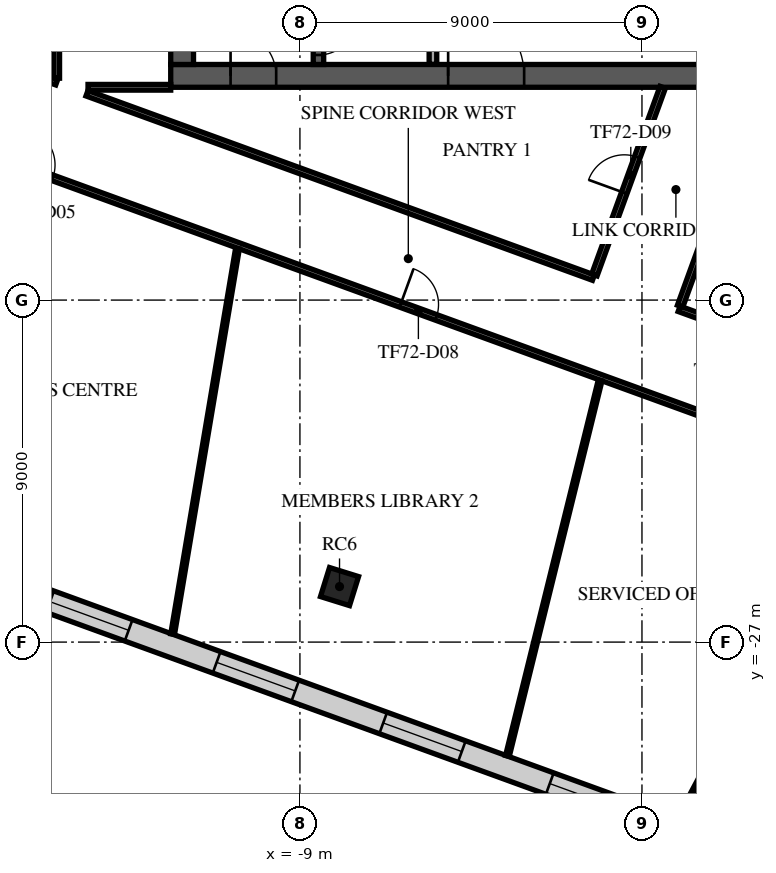
"""IFC4 building model, lengths in metres.
Left out: names, types, materials, properties, quantities, classifications, styles, units other than length and angle.
Written with IfcOpenShell. Run it as: python <this file> out.ifc"""

import sys

from ifc_helpers import new_model, si_unit, direction, frame, frame_2d, origin, origin_2d, place, context, subcontext, project, spatial, rectangle, extrude, element, fill, save


model = new_model("IFC4")
c1 = context("Model", 3, precision=1e-05, world=origin(), true_north=direction((0.0, 1.0)))
c2 = subcontext(c1, "Body", "Model", "MODEL_VIEW")
j1 = project(units=[si_unit("LENGTHUNIT", "METRE"), si_unit("PLANEANGLEUNIT", "RADIAN")], contexts=[c1])
p1 = place(None, origin())
s1 = spatial("IfcSite", under=j1, at=p1, CompositionType="ELEMENT")
p2 = place(p1, origin())
s2 = spatial("IfcBuilding", under=s1, at=p2, CompositionType="ELEMENT")
p3 = place(p2, frame((0.0, 0.0, 304.5)))
s3 = spatial("IfcBuildingStorey", under=s2, at=p3, CompositionType="ELEMENT", Elevation=304.5)
p4 = place(p3, frame((-7.958, -25.539, 0.0), z_axis=(0.0, 0.0, 1.0), x_axis=(0.297503182032, 0.954720826567, 0.0)))
e1 = element("IfcColumn", 1, at=p4, inside=s3, PredefinedType="COLUMN", context=c2, shape_type="SweptSolid", body=[
    extrude(rectangle(XDim=0.8, YDim=0.8, at=origin_2d()), origin(), (0.0, 0.0, 1.0), 4.0),
])
p5 = place(p3, frame((-12.4, -12.1, 0.0), z_axis=(0.0, 0.0, 1.0), x_axis=(1.0, 0.0, 0.0)))
e2 = element("IfcWall", 2, at=p5, inside=s3, PredefinedType="SHEAR", context=c2, shape_type="SweptSolid", body=[
    extrude(rectangle(XDim=24.8, YDim=0.6, at=frame_2d((12.4, 0.0))), origin(), (0.0, 0.0, 1.0), 3.65),
])
p6 = place(p5, frame((7.3, 0.0, 0.0)))
e3 = element("IfcOpeningElement", 3, at=p6, cuts=e2, PredefinedType="OPENING", context=c2, shape_type="SweptSolid", body=[
    extrude(rectangle(XDim=2.0, YDim=2.1, at=frame_2d((1.0, 1.05))), frame((0.0, 0.31, 0.0), z_axis=(0.0, -1.0, 0.0), x_axis=(1.0, 0.0, 0.0)), (0.0, 0.0, 1.0), 0.62),
])
p7 = place(p5, frame((17.425, 0.0, 0.0)))
e4 = element("IfcOpeningElement", 4, at=p7, cuts=e2, PredefinedType="OPENING", context=c2, shape_type="SweptSolid", body=[
    extrude(rectangle(XDim=1.2, YDim=2.1, at=frame_2d((0.6, 1.05))), frame((0.0, 0.31, 0.0), z_axis=(0.0, -1.0, 0.0), x_axis=(1.0, 0.0, 0.0)), (0.0, 0.0, 1.0), 0.62),
])
p8 = place(p5, frame((1.575, 0.0, 0.0)))
e5 = element("IfcOpeningElement", 5, at=p8, cuts=e2, PredefinedType="OPENING", context=c2, shape_type="SweptSolid", body=[
    extrude(rectangle(XDim=1.2, YDim=2.1, at=frame_2d((0.6, 1.05))), frame((0.0, 0.31, 0.0), z_axis=(0.0, -1.0, 0.0), x_axis=(1.0, 0.0, 0.0)), (0.0, 0.0, 1.0), 0.62),
])
p9 = place(p5, frame((22.025, 0.0, 0.0)))
e6 = element("IfcOpeningElement", 6, at=p9, cuts=e2, PredefinedType="OPENING", context=c2, shape_type="SweptSolid", body=[
    extrude(rectangle(XDim=1.2, YDim=2.1, at=frame_2d((0.6, 1.05))), frame((0.0, 0.31, 0.0), z_axis=(0.0, -1.0, 0.0), x_axis=(1.0, 0.0, 0.0)), (0.0, 0.0, 1.0), 0.62),
])
p10 = place(p3, frame((-12.1, -11.8, 0.0), z_axis=(0.0, 0.0, 1.0), x_axis=(0.0, 1.0, 0.0)))
e7 = element("IfcWall", 7, at=p10, inside=s3, PredefinedType="SHEAR", context=c2, shape_type="SweptSolid", body=[
    extrude(rectangle(XDim=23.6, YDim=0.6, at=frame_2d((11.8, 0.0))), origin(), (0.0, 0.0, 1.0), 3.65),
])
p11 = place(p10, frame((10.6, 0.0, 0.0)))
e8 = element("IfcOpeningElement", 8, at=p11, cuts=e7, PredefinedType="OPENING", context=c2, shape_type="SweptSolid", body=[
    extrude(rectangle(XDim=2.4, YDim=2.4, at=frame_2d((1.2, 1.2))), frame((0.0, 0.31, 0.0), z_axis=(0.0, -1.0, 0.0), x_axis=(1.0, 0.0, 0.0)), (0.0, 0.0, 1.0), 0.62),
])
p12 = place(p3, frame((-8.512, -4.55, 0.0), z_axis=(0.0, 0.0, 1.0), x_axis=(0.0, -1.0, 0.0)))
e9 = element("IfcWall", 9, at=p12, inside=s3, PredefinedType="SOLIDWALL", context=c2, shape_type="SweptSolid", body=[
    extrude(rectangle(XDim=7.25, YDim=0.275, at=frame_2d((3.625, 0.0))), origin(), (0.0, 0.0, 1.0), 3.65),
])
p13 = place(p12, frame((6.0, 0.0, 0.0)))
e10 = element("IfcOpeningElement", 10, at=p13, cuts=e9, PredefinedType="OPENING", context=c2, shape_type="SweptSolid", body=[
    extrude(rectangle(XDim=1.0, YDim=2.1, at=frame_2d((0.5, 1.05))), frame((0.0, 0.147, 0.0), z_axis=(0.0, -1.0, 0.0), x_axis=(1.0, 0.0, 0.0)), (0.0, 0.0, 1.0), 0.295),
])
p14 = place(p3, frame((-5.5, -11.795, 0.0), z_axis=(0.0, 0.0, 1.0), x_axis=(0.0, 1.0, 0.0)))
e11 = element("IfcWall", 11, at=p14, inside=s3, PredefinedType="PARTITIONING", context=c2, shape_type="SweptSolid", body=[
    extrude(rectangle(XDim=2.99, YDim=0.2, at=frame_2d((1.495, 0.0))), origin(), (0.0, 0.0, 1.0), 3.65),
])
p15 = place(p14, frame((0.657, 0.0, 0.0)))
e12 = element("IfcOpeningElement", 12, at=p15, cuts=e11, PredefinedType="OPENING", context=c2, shape_type="SweptSolid", body=[
    extrude(rectangle(XDim=1.8, YDim=2.1, at=frame_2d((0.9, 1.05))), frame((0.0, 0.11, 0.0), z_axis=(0.0, -1.0, 0.0), x_axis=(1.0, 0.0, 0.0)), (0.0, 0.0, 1.0), 0.22),
])
p16 = place(p3, frame((-29.882, -20.73, 0.0), z_axis=(0.0, 0.0, 1.0), x_axis=(0.939693709578, -0.34201715188, 0.0)))
e13 = element("IfcWall", 13, at=p16, inside=s3, PredefinedType="STANDARD", context=c2, shape_type="SweptSolid", body=[
    extrude(rectangle(XDim=41.979, YDim=0.6, at=frame_2d((20.99, 0.0))), origin(), (0.0, 0.0, 1.0), 3.65),
])
p17 = place(p16, frame((1.232, 0.0, 0.9)))
e14 = element("IfcOpeningElement", 14, at=p17, cuts=e13, PredefinedType="OPENING", context=c2, shape_type="SweptSolid", body=[
    extrude(rectangle(XDim=2.2, YDim=2.1, at=frame_2d((1.1, 1.05))), frame((0.0, 0.31, 0.0), z_axis=(0.0, -1.0, 0.0), x_axis=(1.0, 0.0, 0.0)), (0.0, 0.0, 1.0), 0.62),
])
p18 = place(p16, frame((5.896, 0.0, 0.9)))
e15 = element("IfcOpeningElement", 15, at=p18, cuts=e13, PredefinedType="OPENING", context=c2, shape_type="SweptSolid", body=[
    extrude(rectangle(XDim=2.2, YDim=2.1, at=frame_2d((1.1, 1.05))), frame((0.0, 0.31, 0.0), z_axis=(0.0, -1.0, 0.0), x_axis=(1.0, 0.0, 0.0)), (0.0, 0.0, 1.0), 0.62),
])
p19 = place(p16, frame((10.561, 0.0, 0.9)))
e16 = element("IfcOpeningElement", 16, at=p19, cuts=e13, PredefinedType="OPENING", context=c2, shape_type="SweptSolid", body=[
    extrude(rectangle(XDim=2.2, YDim=2.1, at=frame_2d((1.1, 1.05))), frame((0.0, 0.31, 0.0), z_axis=(0.0, -1.0, 0.0), x_axis=(1.0, 0.0, 0.0)), (0.0, 0.0, 1.0), 0.62),
])
p20 = place(p16, frame((15.225, 0.0, 0.9)))
e17 = element("IfcOpeningElement", 17, at=p20, cuts=e13, PredefinedType="OPENING", context=c2, shape_type="SweptSolid", body=[
    extrude(rectangle(XDim=2.2, YDim=2.1, at=frame_2d((1.1, 1.05))), frame((0.0, 0.31, 0.0), z_axis=(0.0, -1.0, 0.0), x_axis=(1.0, 0.0, 0.0)), (0.0, 0.0, 1.0), 0.62),
])
p21 = place(p16, frame((19.89, 0.0, 0.9)))
e18 = element("IfcOpeningElement", 18, at=p21, cuts=e13, PredefinedType="OPENING", context=c2, shape_type="SweptSolid", body=[
    extrude(rectangle(XDim=2.2, YDim=2.1, at=frame_2d((1.1, 1.05))), frame((0.0, 0.31, 0.0), z_axis=(0.0, -1.0, 0.0), x_axis=(1.0, 0.0, 0.0)), (0.0, 0.0, 1.0), 0.62),
])
p22 = place(p16, frame((24.554, 0.0, 0.9)))
e19 = element("IfcOpeningElement", 19, at=p22, cuts=e13, PredefinedType="OPENING", context=c2, shape_type="SweptSolid", body=[
    extrude(rectangle(XDim=2.2, YDim=2.1, at=frame_2d((1.1, 1.05))), frame((0.0, 0.31, 0.0), z_axis=(0.0, -1.0, 0.0), x_axis=(1.0, 0.0, 0.0)), (0.0, 0.0, 1.0), 0.62),
])
p23 = place(p16, frame((29.218, 0.0, 0.9)))
e20 = element("IfcOpeningElement", 20, at=p23, cuts=e13, PredefinedType="OPENING", context=c2, shape_type="SweptSolid", body=[
    extrude(rectangle(XDim=2.2, YDim=2.1, at=frame_2d((1.1, 1.05))), frame((0.0, 0.31, 0.0), z_axis=(0.0, -1.0, 0.0), x_axis=(1.0, 0.0, 0.0)), (0.0, 0.0, 1.0), 0.62),
])
p24 = place(p16, frame((33.883, 0.0, 0.9)))
e21 = element("IfcOpeningElement", 21, at=p24, cuts=e13, PredefinedType="OPENING", context=c2, shape_type="SweptSolid", body=[
    extrude(rectangle(XDim=2.2, YDim=2.1, at=frame_2d((1.1, 1.05))), frame((0.0, 0.31, 0.0), z_axis=(0.0, -1.0, 0.0), x_axis=(1.0, 0.0, 0.0)), (0.0, 0.0, 1.0), 0.62),
])
p25 = place(p16, frame((38.547, 0.0, 0.9)))
e22 = element("IfcOpeningElement", 22, at=p25, cuts=e13, PredefinedType="OPENING", context=c2, shape_type="SweptSolid", body=[
    extrude(rectangle(XDim=2.2, YDim=2.1, at=frame_2d((1.1, 1.05))), frame((0.0, 0.31, 0.0), z_axis=(0.0, -1.0, 0.0), x_axis=(1.0, 0.0, 0.0)), (0.0, 0.0, 1.0), 0.62),
])
p26 = place(p3, frame((-24.679, -11.445, 0.0), z_axis=(0.0, 0.0, 1.0), x_axis=(0.939685239834, -0.342040421645, 0.0)))
e23 = element("IfcWall", 23, at=p26, inside=s3, PredefinedType="PARTITIONING", context=c2, shape_type="SweptSolid", body=[
    extrude(rectangle(XDim=38.628, YDim=0.15, at=frame_2d((19.314, 0.0))), origin(), (0.0, 0.0, 1.0), 3.25),
])
p27 = place(p26, frame((8.764, 0.0, 0.0)))
e24 = element("IfcOpeningElement", 24, at=p27, cuts=e23, PredefinedType="OPENING", context=c2, shape_type="SweptSolid", body=[
    extrude(rectangle(XDim=1.0, YDim=2.1, at=frame_2d((0.5, 1.05))), frame((0.0, 0.085, 0.0), z_axis=(0.0, -1.0, 0.0), x_axis=(1.0, 0.0, 0.0)), (0.0, 0.0, 1.0), 0.17),
])
p28 = place(p26, frame((19.503, 0.0, 0.0)))
e25 = element("IfcOpeningElement", 25, at=p28, cuts=e23, PredefinedType="OPENING", context=c2, shape_type="SweptSolid", body=[
    extrude(rectangle(XDim=1.0, YDim=2.1, at=frame_2d((0.5, 1.05))), frame((0.0, 0.085, 0.0), z_axis=(0.0, -1.0, 0.0), x_axis=(1.0, 0.0, 0.0)), (0.0, 0.0, 1.0), 0.17),
])
p29 = place(p26, frame((29.163, 0.0, 0.0)))
e26 = element("IfcOpeningElement", 26, at=p29, cuts=e23, PredefinedType="OPENING", context=c2, shape_type="SweptSolid", body=[
    extrude(rectangle(XDim=1.0, YDim=2.1, at=frame_2d((0.5, 1.05))), frame((0.0, 0.085, 0.0), z_axis=(0.0, -1.0, 0.0), x_axis=(1.0, 0.0, 0.0)), (0.0, 0.0, 1.0), 0.17),
])
p30 = place(p3, frame((-23.858, -9.19, 0.0), z_axis=(0.0, 0.0, 1.0), x_axis=(0.939702320302, -0.341993492948, 0.0)))
e27 = element("IfcWall", 27, at=p30, inside=s3, PredefinedType="PARTITIONING", context=c2, shape_type="SweptSolid", body=[
    extrude(rectangle(XDim=9.001, YDim=0.15, at=frame_2d((4.5, 0.0))), origin(), (0.0, 0.0, 1.0), 3.25),
])
p31 = place(p30, frame((1.05, 0.0, 0.0)))
e28 = element("IfcOpeningElement", 28, at=p31, cuts=e27, PredefinedType="OPENING", context=c2, shape_type="SweptSolid", body=[
    extrude(rectangle(XDim=1.0, YDim=2.1, at=frame_2d((0.5, 1.05))), frame((0.0, 0.085, 0.0), z_axis=(0.0, -1.0, 0.0), x_axis=(1.0, 0.0, 0.0)), (0.0, 0.0, 1.0), 0.17),
])
p32 = place(p3, frame((-15.4, -12.161, 0.0), z_axis=(0.0, 0.0, 1.0), x_axis=(0.0, 1.0, 0.0)))
e29 = element("IfcWall", 29, at=p32, inside=s3, PredefinedType="PARTITIONING", context=c2, shape_type="SweptSolid", body=[
    extrude(rectangle(XDim=24.561, YDim=0.15, at=frame_2d((12.28, 0.0))), origin(), (0.0, 0.0, 1.0), 3.25),
])
p33 = place(p32, frame((0.8, 0.0, 0.0)))
e30 = element("IfcOpeningElement", 30, at=p33, cuts=e29, PredefinedType="OPENING", context=c2, shape_type="SweptSolid", body=[
    extrude(rectangle(XDim=1.8, YDim=2.1, at=frame_2d((0.9, 1.05))), frame((0.0, 0.085, 0.0), z_axis=(0.0, -1.0, 0.0), x_axis=(1.0, 0.0, 0.0)), (0.0, 0.0, 1.0), 0.17),
])
p34 = place(p32, frame((11.845, 0.0, 0.0)))
e31 = element("IfcOpeningElement", 31, at=p34, cuts=e29, PredefinedType="OPENING", context=c2, shape_type="SweptSolid", body=[
    extrude(rectangle(XDim=1.0, YDim=2.1, at=frame_2d((0.5, 1.05))), frame((0.0, 0.085, 0.0), z_axis=(0.0, -1.0, 0.0), x_axis=(1.0, 0.0, 0.0)), (0.0, 0.0, 1.0), 0.17),
])
p35 = place(p32, frame((16.824, 0.0, 0.0)))
e32 = element("IfcOpeningElement", 32, at=p35, cuts=e29, PredefinedType="OPENING", context=c2, shape_type="SweptSolid", body=[
    extrude(rectangle(XDim=1.0, YDim=2.1, at=frame_2d((0.5, 1.05))), frame((0.0, 0.085, 0.0), z_axis=(0.0, -1.0, 0.0), x_axis=(1.0, 0.0, 0.0)), (0.0, 0.0, 1.0), 0.17),
])
p36 = place(p3, frame((-14.604, -12.558, 0.0), z_axis=(0.0, 0.0, 1.0), x_axis=(0.93968732693, -0.342034687724, 0.0)))
e33 = element("IfcWall", 33, at=p36, inside=s3, PredefinedType="PARTITIONING", context=c2, shape_type="SweptSolid", body=[
    extrude(rectangle(XDim=14.182, YDim=0.15, at=frame_2d((7.091, 0.0))), origin(), (0.0, 0.0, 1.0), 3.25),
])
p37 = place(p3, frame((-14.576, -12.4, 0.0), z_axis=(0.0, 0.0, 1.0), x_axis=(1.0, 0.0, 0.0)))
e34 = element("IfcWall", 34, at=p37, inside=s3, PredefinedType="PARTITIONING", context=c2, shape_type="SweptSolid", body=[
    extrude(rectangle(XDim=2.176, YDim=0.15, at=frame_2d((1.088, 0.0))), origin(), (0.0, 0.0, 1.0), 3.13),
])
p38 = place(p3, frame((-1.251, -17.338, 0.0), z_axis=(0.0, 0.0, 1.0), x_axis=(0.341963126629, 0.939713371207, 0.0)))
e35 = element("IfcWall", 35, at=p38, inside=s3, PredefinedType="PARTITIONING", context=c2, shape_type="SweptSolid", body=[
    extrude(rectangle(XDim=5.255, YDim=0.15, at=frame_2d((2.628, 0.0))), origin(), (0.0, 0.0, 1.0), 3.65),
])
p39 = place(p38, frame((2.3, 0.0, 0.0)))
e36 = element("IfcOpeningElement", 36, at=p39, cuts=e35, PredefinedType="OPENING", context=c2, shape_type="SweptSolid", body=[
    extrude(rectangle(XDim=1.0, YDim=2.1, at=frame_2d((0.5, 1.05))), frame((0.0, 0.085, 0.0), z_axis=(0.0, -1.0, 0.0), x_axis=(1.0, 0.0, 0.0)), (0.0, 0.0, 1.0), 0.17),
])
p40 = place(p3, frame((0.978, -18.23, 0.0), z_axis=(0.0, 0.0, 1.0), x_axis=(0.939684094149, -0.34204356916, 0.0)))
e37 = element("IfcWall", 37, at=p40, inside=s3, PredefinedType="PARTITIONING", context=c2, shape_type="SweptSolid", body=[
    extrude(rectangle(XDim=12.198, YDim=0.15, at=frame_2d((6.099, 0.0))), origin(), (0.0, 0.0, 1.0), 3.25),
])
p41 = place(p40, frame((1.05, 0.0, 0.0)))
e38 = element("IfcOpeningElement", 38, at=p41, cuts=e37, PredefinedType="OPENING", context=c2, shape_type="SweptSolid", body=[
    extrude(rectangle(XDim=1.0, YDim=2.1, at=frame_2d((0.5, 1.05))), frame((0.0, 0.085, 0.0), z_axis=(0.0, -1.0, 0.0), x_axis=(1.0, 0.0, 0.0)), (0.0, 0.0, 1.0), 0.17),
])
p42 = place(p40, frame((9.083, 0.0, 0.0)))
e39 = element("IfcOpeningElement", 39, at=p42, cuts=e37, PredefinedType="OPENING", context=c2, shape_type="SweptSolid", body=[
    extrude(rectangle(XDim=1.0, YDim=2.1, at=frame_2d((0.5, 1.05))), frame((0.0, 0.085, 0.0), z_axis=(0.0, -1.0, 0.0), x_axis=(1.0, 0.0, 0.0)), (0.0, 0.0, 1.0), 0.17),
])
p43 = place(p3, frame((1.004, -18.159, 0.0), z_axis=(0.0, 0.0, 1.0), x_axis=(0.342023405877, 0.939691433308, 0.0)))
e40 = element("IfcWall", 40, at=p43, inside=s3, PredefinedType="PARTITIONING", context=c2, shape_type="SweptSolid", body=[
    extrude(rectangle(XDim=2.937, YDim=0.15, at=frame_2d((1.468, 0.0))), origin(), (0.0, 0.0, 1.0), 3.65),
])
p44 = place(p3, frame((-12.349, -26.79, 0.0), z_axis=(0.0, 0.0, 1.0), x_axis=(0.165814832818, 0.986156904969, 0.0)))
e41 = element("IfcWall", 41, at=p44, inside=s3, PredefinedType="PARTITIONING", context=c2, shape_type="SweptSolid", body=[
    extrude(rectangle(XDim=10.289, YDim=0.1, at=frame_2d((5.145, 0.0))), origin(), (0.0, 0.0, 1.0), 3.05),
])
p45 = place(p3, frame((-3.54, -29.996, 0.0), z_axis=(0.0, 0.0, 1.0), x_axis=(0.239628478721, 0.970864662137, 0.0)))
e42 = element("IfcWall", 42, at=p45, inside=s3, PredefinedType="PARTITIONING", context=c2, shape_type="SweptSolid", body=[
    extrude(rectangle(XDim=10.18, YDim=0.1, at=frame_2d((5.09, 0.0))), origin(), (0.0, 0.0, 1.0), 3.05),
])
p46 = place(p3, frame((0.982, -31.642, 0.0), z_axis=(0.0, 0.0, 1.0), x_axis=(0.469538881217, 0.882911795722, 0.0)))
e43 = element("IfcWall", 43, at=p46, inside=s3, PredefinedType="PARTITIONING", context=c2, shape_type="SweptSolid", body=[
    extrude(rectangle(XDim=10.219, YDim=0.1, at=frame_2d((5.11, 0.0))), origin(), (0.0, 0.0, 1.0), 3.05),
])
p47 = place(p6, origin())
e44 = element("IfcDoor", 44, at=p47, inside=s3, OperationType="SINGLE_SWING_LEFT", PredefinedType="DOOR", context=c2, shape_type="SweptSolid", body=[
    extrude(rectangle(XDim=2.0, YDim=2.1, at=frame_2d((1.0, 1.05))), frame((0.0, 0.025, 0.0), z_axis=(0.0, -1.0, 0.0), x_axis=(1.0, 0.0, 0.0)), (0.0, 0.0, 1.0), 0.05),
])
fill(e3, e44)
p48 = place(p8, origin())
e45 = element("IfcDoor", 45, at=p48, inside=s3, OperationType="SINGLE_SWING_LEFT", PredefinedType="DOOR", context=c2, shape_type="SweptSolid", body=[
    extrude(rectangle(XDim=1.2, YDim=2.1, at=frame_2d((0.6, 1.05))), frame((0.0, 0.025, 0.0), z_axis=(0.0, -1.0, 0.0), x_axis=(1.0, 0.0, 0.0)), (0.0, 0.0, 1.0), 0.05),
])
fill(e5, e45)
p49 = place(p13, origin())
e46 = element("IfcDoor", 46, at=p49, inside=s3, OperationType="SINGLE_SWING_LEFT", PredefinedType="DOOR", context=c2, shape_type="SweptSolid", body=[
    extrude(rectangle(XDim=1.0, YDim=2.1, at=frame_2d((0.5, 1.05))), frame((0.0, 0.025, 0.0), z_axis=(0.0, -1.0, 0.0), x_axis=(1.0, 0.0, 0.0)), (0.0, 0.0, 1.0), 0.05),
])
fill(e10, e46)
p50 = place(p20, origin())
e47 = element("IfcWindow", 47, at=p50, inside=s3, PartitioningType="SINGLE_PANEL", PredefinedType="WINDOW", context=c2, shape_type="SweptSolid", body=[
    extrude(rectangle(XDim=2.2, YDim=2.1, at=frame_2d((1.1, 1.05))), frame((0.0, 0.03, 0.0), z_axis=(0.0, -1.0, 0.0), x_axis=(1.0, 0.0, 0.0)), (0.0, 0.0, 1.0), 0.06),
])
fill(e17, e47)
p51 = place(p21, origin())
e48 = element("IfcWindow", 48, at=p51, inside=s3, PartitioningType="SINGLE_PANEL", PredefinedType="WINDOW", context=c2, shape_type="SweptSolid", body=[
    extrude(rectangle(XDim=2.2, YDim=2.1, at=frame_2d((1.1, 1.05))), frame((0.0, 0.03, 0.0), z_axis=(0.0, -1.0, 0.0), x_axis=(1.0, 0.0, 0.0)), (0.0, 0.0, 1.0), 0.06),
])
fill(e18, e48)
p52 = place(p22, origin())
e49 = element("IfcWindow", 49, at=p52, inside=s3, PartitioningType="SINGLE_PANEL", PredefinedType="WINDOW", context=c2, shape_type="SweptSolid", body=[
    extrude(rectangle(XDim=2.2, YDim=2.1, at=frame_2d((1.1, 1.05))), frame((0.0, 0.03, 0.0), z_axis=(0.0, -1.0, 0.0), x_axis=(1.0, 0.0, 0.0)), (0.0, 0.0, 1.0), 0.06),
])
fill(e19, e49)
p53 = place(p23, origin())
e50 = element("IfcWindow", 50, at=p53, inside=s3, PartitioningType="SINGLE_PANEL", PredefinedType="WINDOW", context=c2, shape_type="SweptSolid", body=[
    extrude(rectangle(XDim=2.2, YDim=2.1, at=frame_2d((1.1, 1.05))), frame((0.0, 0.03, 0.0), z_axis=(0.0, -1.0, 0.0), x_axis=(1.0, 0.0, 0.0)), (0.0, 0.0, 1.0), 0.06),
])
fill(e20, e50)
p54 = place(p27, frame((1.0, 0.0, 0.0), z_axis=(0.0, 0.0, 1.0), x_axis=(-1.0, 0.0, 0.0)))
e51 = element("IfcDoor", 51, at=p54, inside=s3, OperationType="SINGLE_SWING_LEFT", PredefinedType="DOOR", context=c2, shape_type="SweptSolid", body=[
    extrude(rectangle(XDim=1.0, YDim=2.1, at=frame_2d((0.5, 1.05))), frame((0.0, 0.025, 0.0), z_axis=(0.0, -1.0, 0.0), x_axis=(1.0, 0.0, 0.0)), (0.0, 0.0, 1.0), 0.05),
])
fill(e24, e51)
p55 = place(p28, frame((1.0, 0.0, 0.0), z_axis=(0.0, 0.0, 1.0), x_axis=(-1.0, 0.0, 0.0)))
e52 = element("IfcDoor", 52, at=p55, inside=s3, OperationType="SINGLE_SWING_LEFT", PredefinedType="DOOR", context=c2, shape_type="SweptSolid", body=[
    extrude(rectangle(XDim=1.0, YDim=2.1, at=frame_2d((0.5, 1.05))), frame((0.0, 0.025, 0.0), z_axis=(0.0, -1.0, 0.0), x_axis=(1.0, 0.0, 0.0)), (0.0, 0.0, 1.0), 0.05),
])
fill(e25, e52)
p56 = place(p39, origin())
e53 = element("IfcDoor", 53, at=p56, inside=s3, OperationType="SINGLE_SWING_RIGHT", PredefinedType="DOOR", context=c2, shape_type="SweptSolid", body=[
    extrude(rectangle(XDim=1.0, YDim=2.1, at=frame_2d((0.5, 1.05))), frame((0.0, 0.025, 0.0), z_axis=(0.0, -1.0, 0.0), x_axis=(1.0, 0.0, 0.0)), (0.0, 0.0, 1.0), 0.05),
])
fill(e36, e53)
save(model, sys.argv[1])
